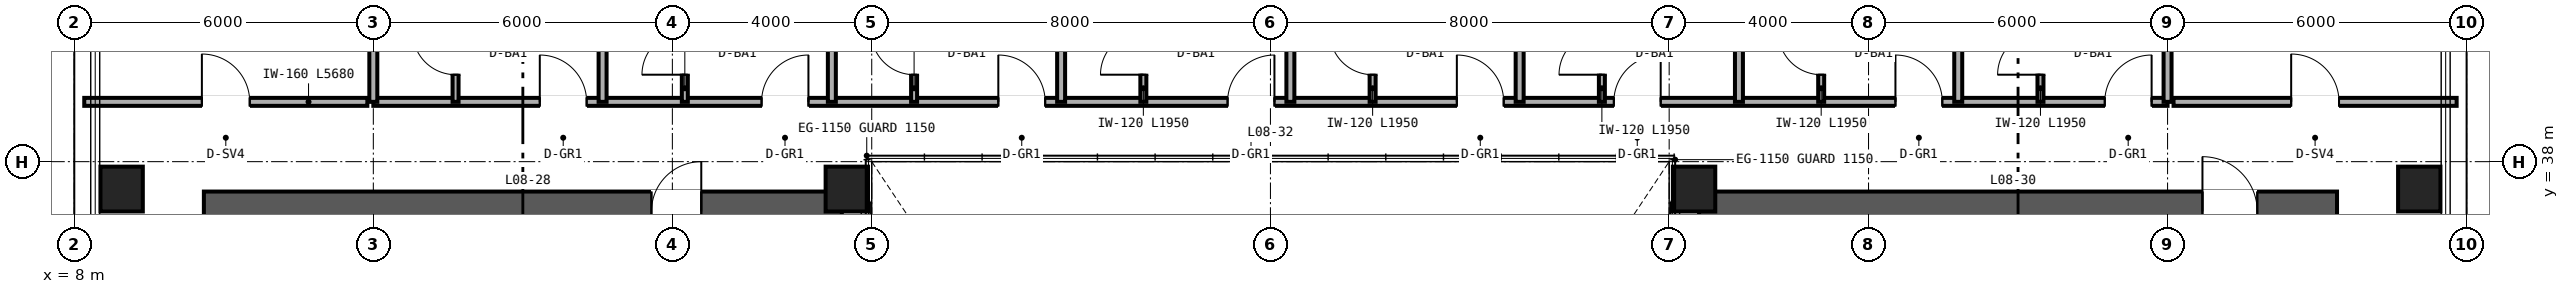
"""IFC4 building model, lengths in metres.
Left out: names, types, materials, properties, quantities, classifications, styles, units other than length and angle.
Written with IfcOpenShell. Run it as: python <this file> out.ifc"""

import sys

from ifc_helpers import new_model, si_unit, direction, frame, frame_2d, origin, origin_2d, place, context, subcontext, project, spatial, rectangle, hollow_rectangle, extrude, source, transform, mapped, element, fill, save


model = new_model("IFC4")
c1 = context("Model", 3, precision=1e-05, world=origin(), true_north=direction((0.0, 1.0)))
c2 = subcontext(c1, "Body", "Model", "MODEL_VIEW")
j1 = project(units=[si_unit("LENGTHUNIT", "METRE"), si_unit("PLANEANGLEUNIT", "RADIAN")], contexts=[c1])
p1 = place(None, origin())
s1 = spatial("IfcSite", under=j1, at=p1, CompositionType="ELEMENT")
p2 = place(p1, origin())
s2 = spatial("IfcBuilding", under=s1, at=p2, CompositionType="ELEMENT")
p3 = place(p2, frame((0.0, 0.0, 38.4)))
s3 = spatial("IfcBuildingStorey", under=s2, at=p3, CompositionType="ELEMENT", Elevation=38.4)
p4 = place(p3, frame((10.6, 37.0, 0.0), z_axis=(0.0, 0.0, 1.0), x_axis=(1.0, 0.0, 0.0)))
e1 = element("IfcWall", 1, at=p4, inside=s3, PredefinedType="SHEAR", context=c2, shape_type="SweptSolid", body=[
    extrude(rectangle(XDim=12.8, YDim=0.8, at=frame_2d((6.4, 0.0))), origin(), (0.0, 0.0, 1.0), 3.35),
])
p5 = place(p4, frame((8.98, 0.0, 0.0)))
e2 = element("IfcOpeningElement", 2, at=p5, cuts=e1, PredefinedType="OPENING", context=c2, shape_type="SweptSolid", body=[
    extrude(rectangle(XDim=1.0, YDim=2.15, at=frame_2d((0.5, 1.075))), frame((0.0, 0.41, 0.0), z_axis=(0.0, -1.0, 0.0), x_axis=(1.0, 0.0, 0.0)), (0.0, 0.0, 1.0), 0.82),
])
p6 = place(p3, frame((40.6, 37.0, 0.0), z_axis=(0.0, 0.0, 1.0), x_axis=(1.0, 0.0, 0.0)))
e3 = element("IfcWall", 3, at=p6, inside=s3, PredefinedType="SHEAR", context=c2, shape_type="SweptSolid", body=[
    extrude(rectangle(XDim=12.8, YDim=0.8, at=frame_2d((6.4, 0.0))), origin(), (0.0, 0.0, 1.0), 3.35),
])
p7 = place(p6, frame((10.1, 0.0, 0.0)))
e4 = element("IfcOpeningElement", 4, at=p7, cuts=e3, PredefinedType="OPENING", context=c2, shape_type="SweptSolid", body=[
    extrude(rectangle(XDim=1.1, YDim=2.15, at=frame_2d((0.55, 1.075))), frame((0.0, 0.41, 0.0), z_axis=(0.0, -1.0, 0.0), x_axis=(1.0, 0.0, 0.0)), (0.0, 0.0, 1.0), 0.82),
])
m1 = source(origin(), c2, "Body", "SweptSolid", [
    extrude(hollow_rectangle(XDim=0.85, YDim=0.9, WallThickness=0.04, at=origin_2d()), origin(), (0.0, 0.0, 1.0), 3.35),
])
for number, where, z_axis, x_axis in (
    (5, (8.95, 37.45, 0.0), (0.0, 0.0, 1.0), (1.0, 0.0, 0.0)),
    (6, (23.5, 37.45, 0.0), (0.0, 0.0, 1.0), (1.0, 0.0, 0.0)),
    (7, (40.5, 37.45, 0.0), (0.0, 0.0, 1.0), (1.0, 0.0, 0.0)),
    (8, (55.05, 37.45, 0.0), (0.0, 0.0, 1.0), (1.0, 0.0, 0.0)),
):
    element("IfcColumn", number, at=place(p3, frame(where, z_axis=z_axis, x_axis=x_axis)), inside=s3, PredefinedType="COLUMN", context=c2, shape_type="MappedRepresentation", body=[
        mapped(m1, transform((0.0, 0.0, 0.0), scale=1.0)),
    ])
p8 = place(p3, frame((8.2, 39.2, 0.0), z_axis=(0.0, 0.0, 1.0), x_axis=(1.0, 0.0, 0.0)))
e9 = element("IfcWall", 9, at=p8, inside=s3, PredefinedType="PARTITIONING", context=c2, shape_type="SweptSolid", body=[
    extrude(rectangle(XDim=5.68, YDim=0.16, at=frame_2d((2.84, 0.0))), origin(), (0.0, 0.0, 1.0), 3.35),
])
p9 = place(p8, frame((2.36, 0.0, 0.0)))
e10 = element("IfcOpeningElement", 10, at=p9, cuts=e9, PredefinedType="OPENING", context=c2, shape_type="SweptSolid", body=[
    extrude(rectangle(XDim=0.96, YDim=2.15, at=frame_2d((0.48, 1.075))), frame((0.0, 0.09, 0.0), z_axis=(0.0, -1.0, 0.0), x_axis=(1.0, 0.0, 0.0)), (0.0, 0.0, 1.0), 0.18),
])
p10 = place(p3, frame((50.12, 39.2, 0.0), z_axis=(0.0, 0.0, 1.0), x_axis=(1.0, 0.0, 0.0)))
e11 = element("IfcWall", 11, at=p10, inside=s3, PredefinedType="PARTITIONING", context=c2, shape_type="SweptSolid", body=[
    extrude(rectangle(XDim=5.68, YDim=0.16, at=frame_2d((2.84, 0.0))), origin(), (0.0, 0.0, 1.0), 3.35),
])
p11 = place(p10, frame((2.36, 0.0, 0.0)))
e12 = element("IfcOpeningElement", 12, at=p11, cuts=e11, PredefinedType="OPENING", context=c2, shape_type="SweptSolid", body=[
    extrude(rectangle(XDim=0.96, YDim=2.15, at=frame_2d((0.48, 1.075))), frame((0.0, 0.09, 0.0), z_axis=(0.0, -1.0, 0.0), x_axis=(1.0, 0.0, 0.0)), (0.0, 0.0, 1.0), 0.18),
])
p12 = place(p3, frame((14.0, 39.2, 0.0), z_axis=(0.0, 0.0, 1.0), x_axis=(1.0, 0.0, 0.0)))
e13 = element("IfcWall", 13, at=p12, inside=s3, PredefinedType="PARTITIONING", context=c2, shape_type="SweptSolid", body=[
    extrude(rectangle(XDim=36.0, YDim=0.16, at=frame_2d((18.0, 0.0))), origin(), (0.0, 0.0, 1.0), 2.571),
])
p13 = place(p12, frame((3.34, 0.0, 0.0)))
e14 = element("IfcOpeningElement", 14, at=p13, cuts=e13, PredefinedType="OPENING", context=c2, shape_type="SweptSolid", body=[
    extrude(rectangle(XDim=0.94, YDim=2.15, at=frame_2d((0.47, 1.075))), frame((0.0, 0.09, 0.0), z_axis=(0.0, -1.0, 0.0), x_axis=(1.0, 0.0, 0.0)), (0.0, 0.0, 1.0), 0.18),
])
p14 = place(p12, frame((7.79, 0.0, 0.0)))
e15 = element("IfcOpeningElement", 15, at=p14, cuts=e13, PredefinedType="OPENING", context=c2, shape_type="SweptSolid", body=[
    extrude(rectangle(XDim=0.94, YDim=2.15, at=frame_2d((0.47, 1.075))), frame((0.0, 0.09, 0.0), z_axis=(0.0, -1.0, 0.0), x_axis=(1.0, 0.0, 0.0)), (0.0, 0.0, 1.0), 0.18),
])
p15 = place(p12, frame((12.54, 0.0, 0.0)))
e16 = element("IfcOpeningElement", 16, at=p15, cuts=e13, PredefinedType="OPENING", context=c2, shape_type="SweptSolid", body=[
    extrude(rectangle(XDim=0.94, YDim=2.15, at=frame_2d((0.47, 1.075))), frame((0.0, 0.09, 0.0), z_axis=(0.0, -1.0, 0.0), x_axis=(1.0, 0.0, 0.0)), (0.0, 0.0, 1.0), 0.18),
])
p16 = place(p12, frame((17.14, 0.0, 0.0)))
e17 = element("IfcOpeningElement", 17, at=p16, cuts=e13, PredefinedType="OPENING", context=c2, shape_type="SweptSolid", body=[
    extrude(rectangle(XDim=0.94, YDim=2.15, at=frame_2d((0.47, 1.075))), frame((0.0, 0.09, 0.0), z_axis=(0.0, -1.0, 0.0), x_axis=(1.0, 0.0, 0.0)), (0.0, 0.0, 1.0), 0.18),
])
p17 = place(p12, frame((21.74, 0.0, 0.0)))
e18 = element("IfcOpeningElement", 18, at=p17, cuts=e13, PredefinedType="OPENING", context=c2, shape_type="SweptSolid", body=[
    extrude(rectangle(XDim=0.94, YDim=2.15, at=frame_2d((0.47, 1.075))), frame((0.0, 0.09, 0.0), z_axis=(0.0, -1.0, 0.0), x_axis=(1.0, 0.0, 0.0)), (0.0, 0.0, 1.0), 0.18),
])
p18 = place(p12, frame((24.89, 0.0, 0.0)))
e19 = element("IfcOpeningElement", 19, at=p18, cuts=e13, PredefinedType="OPENING", context=c2, shape_type="SweptSolid", body=[
    extrude(rectangle(XDim=0.94, YDim=2.15, at=frame_2d((0.47, 1.075))), frame((0.0, 0.09, 0.0), z_axis=(0.0, -1.0, 0.0), x_axis=(1.0, 0.0, 0.0)), (0.0, 0.0, 1.0), 0.18),
])
p19 = place(p12, frame((30.54, 0.0, 0.0)))
e20 = element("IfcOpeningElement", 20, at=p19, cuts=e13, PredefinedType="OPENING", context=c2, shape_type="SweptSolid", body=[
    extrude(rectangle(XDim=0.94, YDim=2.15, at=frame_2d((0.47, 1.075))), frame((0.0, 0.09, 0.0), z_axis=(0.0, -1.0, 0.0), x_axis=(1.0, 0.0, 0.0)), (0.0, 0.0, 1.0), 0.18),
])
p20 = place(p12, frame((34.74, 0.0, 0.0)))
e21 = element("IfcOpeningElement", 21, at=p20, cuts=e13, PredefinedType="OPENING", context=c2, shape_type="SweptSolid", body=[
    extrude(rectangle(XDim=0.94, YDim=2.15, at=frame_2d((0.47, 1.075))), frame((0.0, 0.09, 0.0), z_axis=(0.0, -1.0, 0.0), x_axis=(1.0, 0.0, 0.0)), (0.0, 0.0, 1.0), 0.18),
])
for number, where, z_axis, x_axis in (
    (22, (14.0, 39.2, 0.0), (0.0, 0.0, 1.0), (0.0, 1.0, 0.0)),
    (23, (50.0, 39.2, 0.0), (0.0, 0.0, 1.0), (0.0, 1.0, 0.0)),
    (24, (18.6, 39.2, 0.0), (0.0, 0.0, 1.0), (0.0, 1.0, 0.0)),
):
    element("IfcWall", number, at=place(p3, frame(where, z_axis=z_axis, x_axis=x_axis)), inside=s3, PredefinedType="PARTITIONING", context=c2, shape_type="SweptSolid", body=[
        extrude(rectangle(XDim=10.44, YDim=0.16, at=frame_2d((5.22, 0.0))), origin(), (0.0, 0.0, 1.0), 2.657),
    ])
p21 = place(p3, frame((15.65, 39.2, 0.0), z_axis=(0.0, 0.0, 1.0), x_axis=(0.0, 1.0, 0.0)))
e25 = element("IfcWall", 25, at=p21, inside=s3, PredefinedType="PARTITIONING", context=c2, shape_type="SweptSolid", body=[
    extrude(rectangle(XDim=1.95, YDim=0.12, at=frame_2d((0.975, 0.0))), origin(), (0.0, 0.0, 1.0), 3.35),
])
p22 = place(p21, frame((0.545, 0.0, 0.0)))
e26 = element("IfcOpeningElement", 26, at=p22, cuts=e25, PredefinedType="OPENING", context=c2, shape_type="SweptSolid", body=[
    extrude(rectangle(XDim=0.86, YDim=2.1, at=frame_2d((0.43, 1.05))), frame((0.0, 0.07, 0.0), z_axis=(0.0, -1.0, 0.0), x_axis=(1.0, 0.0, 0.0)), (0.0, 0.0, 1.0), 0.14),
])
p23 = place(p3, frame((23.2, 39.2, 0.0), z_axis=(0.0, 0.0, 1.0), x_axis=(0.0, 1.0, 0.0)))
e27 = element("IfcWall", 27, at=p23, inside=s3, PredefinedType="PARTITIONING", context=c2, shape_type="SweptSolid", body=[
    extrude(rectangle(XDim=10.44, YDim=0.16, at=frame_2d((5.22, 0.0))), origin(), (0.0, 0.0, 1.0), 2.813),
])
p24 = place(p3, frame((20.25, 39.2, 0.0), z_axis=(0.0, 0.0, 1.0), x_axis=(0.0, 1.0, 0.0)))
e28 = element("IfcWall", 28, at=p24, inside=s3, PredefinedType="PARTITIONING", context=c2, shape_type="SweptSolid", body=[
    extrude(rectangle(XDim=1.95, YDim=0.12, at=frame_2d((0.975, 0.0))), origin(), (0.0, 0.0, 1.0), 3.35),
])
p25 = place(p24, frame((0.545, 0.0, 0.0)))
e29 = element("IfcOpeningElement", 29, at=p25, cuts=e28, PredefinedType="OPENING", context=c2, shape_type="SweptSolid", body=[
    extrude(rectangle(XDim=0.86, YDim=2.1, at=frame_2d((0.43, 1.05))), frame((0.0, 0.07, 0.0), z_axis=(0.0, -1.0, 0.0), x_axis=(1.0, 0.0, 0.0)), (0.0, 0.0, 1.0), 0.14),
])
p26 = place(p3, frame((27.8, 39.2, 0.0), z_axis=(0.0, 0.0, 1.0), x_axis=(0.0, 1.0, 0.0)))
e30 = element("IfcWall", 30, at=p26, inside=s3, PredefinedType="PARTITIONING", context=c2, shape_type="SweptSolid", body=[
    extrude(rectangle(XDim=10.44, YDim=0.16, at=frame_2d((5.22, 0.0))), origin(), (0.0, 0.0, 1.0), 2.423),
])
p27 = place(p3, frame((24.85, 39.2, 0.0), z_axis=(0.0, 0.0, 1.0), x_axis=(0.0, 1.0, 0.0)))
e31 = element("IfcWall", 31, at=p27, inside=s3, PredefinedType="PARTITIONING", context=c2, shape_type="SweptSolid", body=[
    extrude(rectangle(XDim=1.95, YDim=0.12, at=frame_2d((0.975, 0.0))), origin(), (0.0, 0.0, 1.0), 3.35),
])
p28 = place(p27, frame((0.545, 0.0, 0.0)))
e32 = element("IfcOpeningElement", 32, at=p28, cuts=e31, PredefinedType="OPENING", context=c2, shape_type="SweptSolid", body=[
    extrude(rectangle(XDim=0.86, YDim=2.1, at=frame_2d((0.43, 1.05))), frame((0.0, 0.07, 0.0), z_axis=(0.0, -1.0, 0.0), x_axis=(1.0, 0.0, 0.0)), (0.0, 0.0, 1.0), 0.14),
])
p29 = place(p3, frame((32.4, 39.2, 0.0), z_axis=(0.0, 0.0, 1.0), x_axis=(0.0, 1.0, 0.0)))
e33 = element("IfcWall", 33, at=p29, inside=s3, PredefinedType="PARTITIONING", context=c2, shape_type="SweptSolid", body=[
    extrude(rectangle(XDim=10.44, YDim=0.16, at=frame_2d((5.22, 0.0))), origin(), (0.0, 0.0, 1.0), 2.423),
])
p30 = place(p3, frame((29.45, 39.2, 0.0), z_axis=(0.0, 0.0, 1.0), x_axis=(0.0, 1.0, 0.0)))
e34 = element("IfcWall", 34, at=p30, inside=s3, PredefinedType="PARTITIONING", context=c2, shape_type="SweptSolid", body=[
    extrude(rectangle(XDim=1.95, YDim=0.12, at=frame_2d((0.975, 0.0))), origin(), (0.0, 0.0, 1.0), 3.35),
])
p31 = place(p30, frame((0.545, 0.0, 0.0)))
e35 = element("IfcOpeningElement", 35, at=p31, cuts=e34, PredefinedType="OPENING", context=c2, shape_type="SweptSolid", body=[
    extrude(rectangle(XDim=0.86, YDim=2.1, at=frame_2d((0.43, 1.05))), frame((0.0, 0.07, 0.0), z_axis=(0.0, -1.0, 0.0), x_axis=(1.0, 0.0, 0.0)), (0.0, 0.0, 1.0), 0.14),
])
p32 = place(p3, frame((37.0, 39.2, 0.0), z_axis=(0.0, 0.0, 1.0), x_axis=(0.0, 1.0, 0.0)))
e36 = element("IfcWall", 36, at=p32, inside=s3, PredefinedType="PARTITIONING", context=c2, shape_type="SweptSolid", body=[
    extrude(rectangle(XDim=10.44, YDim=0.16, at=frame_2d((5.22, 0.0))), origin(), (0.0, 0.0, 1.0), 2.423),
])
p33 = place(p3, frame((34.05, 39.2, 0.0), z_axis=(0.0, 0.0, 1.0), x_axis=(0.0, 1.0, 0.0)))
e37 = element("IfcWall", 37, at=p33, inside=s3, PredefinedType="PARTITIONING", context=c2, shape_type="SweptSolid", body=[
    extrude(rectangle(XDim=1.95, YDim=0.12, at=frame_2d((0.975, 0.0))), origin(), (0.0, 0.0, 1.0), 3.35),
])
p34 = place(p33, frame((0.545, 0.0, 0.0)))
e38 = element("IfcOpeningElement", 38, at=p34, cuts=e37, PredefinedType="OPENING", context=c2, shape_type="SweptSolid", body=[
    extrude(rectangle(XDim=0.86, YDim=2.1, at=frame_2d((0.43, 1.05))), frame((0.0, 0.07, 0.0), z_axis=(0.0, -1.0, 0.0), x_axis=(1.0, 0.0, 0.0)), (0.0, 0.0, 1.0), 0.14),
])
p35 = place(p3, frame((41.4, 39.2, 0.0), z_axis=(0.0, 0.0, 1.0), x_axis=(0.0, 1.0, 0.0)))
e39 = element("IfcWall", 39, at=p35, inside=s3, PredefinedType="PARTITIONING", context=c2, shape_type="SweptSolid", body=[
    extrude(rectangle(XDim=10.44, YDim=0.16, at=frame_2d((5.22, 0.0))), origin(), (0.0, 0.0, 1.0), 2.813),
])
p36 = place(p3, frame((38.65, 39.2, 0.0), z_axis=(0.0, 0.0, 1.0), x_axis=(0.0, 1.0, 0.0)))
e40 = element("IfcWall", 40, at=p36, inside=s3, PredefinedType="PARTITIONING", context=c2, shape_type="SweptSolid", body=[
    extrude(rectangle(XDim=1.95, YDim=0.12, at=frame_2d((0.975, 0.0))), origin(), (0.0, 0.0, 1.0), 3.35),
])
p37 = place(p36, frame((0.545, 0.0, 0.0)))
e41 = element("IfcOpeningElement", 41, at=p37, cuts=e40, PredefinedType="OPENING", context=c2, shape_type="SweptSolid", body=[
    extrude(rectangle(XDim=0.86, YDim=2.1, at=frame_2d((0.43, 1.05))), frame((0.0, 0.07, 0.0), z_axis=(0.0, -1.0, 0.0), x_axis=(1.0, 0.0, 0.0)), (0.0, 0.0, 1.0), 0.14),
])
p38 = place(p3, frame((45.8, 39.2, 0.0), z_axis=(0.0, 0.0, 1.0), x_axis=(0.0, 1.0, 0.0)))
e42 = element("IfcWall", 42, at=p38, inside=s3, PredefinedType="PARTITIONING", context=c2, shape_type="SweptSolid", body=[
    extrude(rectangle(XDim=10.44, YDim=0.16, at=frame_2d((5.22, 0.0))), origin(), (0.0, 0.0, 1.0), 2.657),
])
p39 = place(p3, frame((43.05, 39.2, 0.0), z_axis=(0.0, 0.0, 1.0), x_axis=(0.0, 1.0, 0.0)))
e43 = element("IfcWall", 43, at=p39, inside=s3, PredefinedType="PARTITIONING", context=c2, shape_type="SweptSolid", body=[
    extrude(rectangle(XDim=1.95, YDim=0.12, at=frame_2d((0.975, 0.0))), origin(), (0.0, 0.0, 1.0), 3.35),
])
p40 = place(p39, frame((0.545, 0.0, 0.0)))
e44 = element("IfcOpeningElement", 44, at=p40, cuts=e43, PredefinedType="OPENING", context=c2, shape_type="SweptSolid", body=[
    extrude(rectangle(XDim=0.86, YDim=2.1, at=frame_2d((0.43, 1.05))), frame((0.0, 0.07, 0.0), z_axis=(0.0, -1.0, 0.0), x_axis=(1.0, 0.0, 0.0)), (0.0, 0.0, 1.0), 0.14),
])
p41 = place(p3, frame((47.45, 39.2, 0.0), z_axis=(0.0, 0.0, 1.0), x_axis=(0.0, 1.0, 0.0)))
e45 = element("IfcWall", 45, at=p41, inside=s3, PredefinedType="PARTITIONING", context=c2, shape_type="SweptSolid", body=[
    extrude(rectangle(XDim=1.95, YDim=0.12, at=frame_2d((0.975, 0.0))), origin(), (0.0, 0.0, 1.0), 3.35),
])
p42 = place(p41, frame((0.545, 0.0, 0.0)))
e46 = element("IfcOpeningElement", 46, at=p42, cuts=e45, PredefinedType="OPENING", context=c2, shape_type="SweptSolid", body=[
    extrude(rectangle(XDim=0.86, YDim=2.1, at=frame_2d((0.43, 1.05))), frame((0.0, 0.07, 0.0), z_axis=(0.0, -1.0, 0.0), x_axis=(1.0, 0.0, 0.0)), (0.0, 0.0, 1.0), 0.14),
])
m2 = source(origin(), c2, "Body", "SweptSolid", [
    extrude(rectangle(XDim=1.0, YDim=2.15, at=frame_2d((0.5, 1.075))), frame((0.0, 0.025, 0.0), z_axis=(0.0, -1.0, 0.0), x_axis=(1.0, 0.0, 0.0)), (0.0, 0.0, 1.0), 0.05),
])
p43 = place(p5, origin())
e47 = element("IfcDoor", 47, at=p43, inside=s3, OperationType="SINGLE_SWING_RIGHT", PredefinedType="DOOR", context=c2, shape_type="MappedRepresentation", body=[
    mapped(m2, transform((0.0, 0.0, 0.0), scale=1.0)),
])
fill(e2, e47)
m3 = source(origin(), c2, "Body", "SweptSolid", [
    extrude(rectangle(XDim=1.1, YDim=2.15, at=frame_2d((0.55, 1.075))), frame((0.0, 0.025, 0.0), z_axis=(0.0, -1.0, 0.0), x_axis=(1.0, 0.0, 0.0)), (0.0, 0.0, 1.0), 0.05),
])
p44 = place(p7, origin())
e48 = element("IfcDoor", 48, at=p44, inside=s3, OperationType="SINGLE_SWING_LEFT", PredefinedType="DOOR", context=c2, shape_type="MappedRepresentation", body=[
    mapped(m3, transform((0.0, 0.0, 0.0), scale=1.0)),
])
fill(e4, e48)
m4 = source(origin(), c2, "Body", "SweptSolid", [
    extrude(rectangle(XDim=0.96, YDim=2.15, at=frame_2d((0.48, 1.075))), frame((0.0, 0.025, 0.0), z_axis=(0.0, -1.0, 0.0), x_axis=(1.0, 0.0, 0.0)), (0.0, 0.0, 1.0), 0.05),
])
p45 = place(p9, origin())
e49 = element("IfcDoor", 49, at=p45, inside=s3, OperationType="SINGLE_SWING_LEFT", PredefinedType="DOOR", context=c2, shape_type="MappedRepresentation", body=[
    mapped(m4, transform((0.0, 0.0, 0.0), scale=1.0)),
])
fill(e10, e49)
p46 = place(p11, origin())
e50 = element("IfcDoor", 50, at=p46, inside=s3, OperationType="SINGLE_SWING_LEFT", PredefinedType="DOOR", context=c2, shape_type="MappedRepresentation", body=[
    mapped(m4, transform((0.0, 0.0, 0.0), scale=1.0)),
])
fill(e12, e50)
m5 = source(origin(), c2, "Body", "SweptSolid", [
    extrude(rectangle(XDim=0.86, YDim=2.1, at=frame_2d((0.43, 1.05))), frame((0.0, 0.025, 0.0), z_axis=(0.0, -1.0, 0.0), x_axis=(1.0, 0.0, 0.0)), (0.0, 0.0, 1.0), 0.05),
])
p47 = place(p22, origin())
e51 = element("IfcDoor", 51, at=p47, inside=s3, OperationType="SINGLE_SWING_RIGHT", PredefinedType="DOOR", context=c2, shape_type="MappedRepresentation", body=[
    mapped(m5, transform((0.0, 0.0, 0.0), scale=1.0)),
])
fill(e26, e51)
p48 = place(p25, origin())
e52 = element("IfcDoor", 52, at=p48, inside=s3, OperationType="SINGLE_SWING_LEFT", PredefinedType="DOOR", context=c2, shape_type="MappedRepresentation", body=[
    mapped(m5, transform((0.0, 0.0, 0.0), scale=1.0)),
])
fill(e29, e52)
p49 = place(p28, origin())
e53 = element("IfcDoor", 53, at=p49, inside=s3, OperationType="SINGLE_SWING_RIGHT", PredefinedType="DOOR", context=c2, shape_type="MappedRepresentation", body=[
    mapped(m5, transform((0.0, 0.0, 0.0), scale=1.0)),
])
fill(e32, e53)
p50 = place(p31, origin())
e54 = element("IfcDoor", 54, at=p50, inside=s3, OperationType="SINGLE_SWING_LEFT", PredefinedType="DOOR", context=c2, shape_type="MappedRepresentation", body=[
    mapped(m5, transform((0.0, 0.0, 0.0), scale=1.0)),
])
fill(e35, e54)
p51 = place(p34, origin())
e55 = element("IfcDoor", 55, at=p51, inside=s3, OperationType="SINGLE_SWING_RIGHT", PredefinedType="DOOR", context=c2, shape_type="MappedRepresentation", body=[
    mapped(m5, transform((0.0, 0.0, 0.0), scale=1.0)),
])
fill(e38, e55)
p52 = place(p37, origin())
e56 = element("IfcDoor", 56, at=p52, inside=s3, OperationType="SINGLE_SWING_LEFT", PredefinedType="DOOR", context=c2, shape_type="MappedRepresentation", body=[
    mapped(m5, transform((0.0, 0.0, 0.0), scale=1.0)),
])
fill(e41, e56)
p53 = place(p40, origin())
e57 = element("IfcDoor", 57, at=p53, inside=s3, OperationType="SINGLE_SWING_RIGHT", PredefinedType="DOOR", context=c2, shape_type="MappedRepresentation", body=[
    mapped(m5, transform((0.0, 0.0, 0.0), scale=1.0)),
])
fill(e44, e57)
p54 = place(p42, origin())
e58 = element("IfcDoor", 58, at=p54, inside=s3, OperationType="SINGLE_SWING_LEFT", PredefinedType="DOOR", context=c2, shape_type="MappedRepresentation", body=[
    mapped(m5, transform((0.0, 0.0, 0.0), scale=1.0)),
])
fill(e46, e58)
m6 = source(origin(), c2, "Body", "SweptSolid", [
    extrude(rectangle(XDim=0.94, YDim=2.15, at=frame_2d((0.47, 1.075))), frame((0.0, 0.025, 0.0), z_axis=(0.0, -1.0, 0.0), x_axis=(1.0, 0.0, 0.0)), (0.0, 0.0, 1.0), 0.05),
])
p55 = place(p13, origin())
e59 = element("IfcDoor", 59, at=p55, inside=s3, OperationType="SINGLE_SWING_LEFT", PredefinedType="DOOR", context=c2, shape_type="MappedRepresentation", body=[
    mapped(m6, transform((0.0, 0.0, 0.0), scale=1.0)),
])
fill(e14, e59)
p56 = place(p14, origin())
e60 = element("IfcDoor", 60, at=p56, inside=s3, OperationType="SINGLE_SWING_RIGHT", PredefinedType="DOOR", context=c2, shape_type="MappedRepresentation", body=[
    mapped(m6, transform((0.0, 0.0, 0.0), scale=1.0)),
])
fill(e15, e60)
p57 = place(p15, origin())
e61 = element("IfcDoor", 61, at=p57, inside=s3, OperationType="SINGLE_SWING_LEFT", PredefinedType="DOOR", context=c2, shape_type="MappedRepresentation", body=[
    mapped(m6, transform((0.0, 0.0, 0.0), scale=1.0)),
])
fill(e16, e61)
p58 = place(p16, origin())
e62 = element("IfcDoor", 62, at=p58, inside=s3, OperationType="SINGLE_SWING_RIGHT", PredefinedType="DOOR", context=c2, shape_type="MappedRepresentation", body=[
    mapped(m6, transform((0.0, 0.0, 0.0), scale=1.0)),
])
fill(e17, e62)
p59 = place(p17, origin())
e63 = element("IfcDoor", 63, at=p59, inside=s3, OperationType="SINGLE_SWING_LEFT", PredefinedType="DOOR", context=c2, shape_type="MappedRepresentation", body=[
    mapped(m6, transform((0.0, 0.0, 0.0), scale=1.0)),
])
fill(e18, e63)
p60 = place(p18, origin())
e64 = element("IfcDoor", 64, at=p60, inside=s3, OperationType="SINGLE_SWING_RIGHT", PredefinedType="DOOR", context=c2, shape_type="MappedRepresentation", body=[
    mapped(m6, transform((0.0, 0.0, 0.0), scale=1.0)),
])
fill(e19, e64)
p61 = place(p19, origin())
e65 = element("IfcDoor", 65, at=p61, inside=s3, OperationType="SINGLE_SWING_LEFT", PredefinedType="DOOR", context=c2, shape_type="MappedRepresentation", body=[
    mapped(m6, transform((0.0, 0.0, 0.0), scale=1.0)),
])
fill(e20, e65)
p62 = place(p20, origin())
e66 = element("IfcDoor", 66, at=p62, inside=s3, OperationType="SINGLE_SWING_RIGHT", PredefinedType="DOOR", context=c2, shape_type="MappedRepresentation", body=[
    mapped(m6, transform((0.0, 0.0, 0.0), scale=1.0)),
])
fill(e21, e66)
save(model, sys.argv[1])
